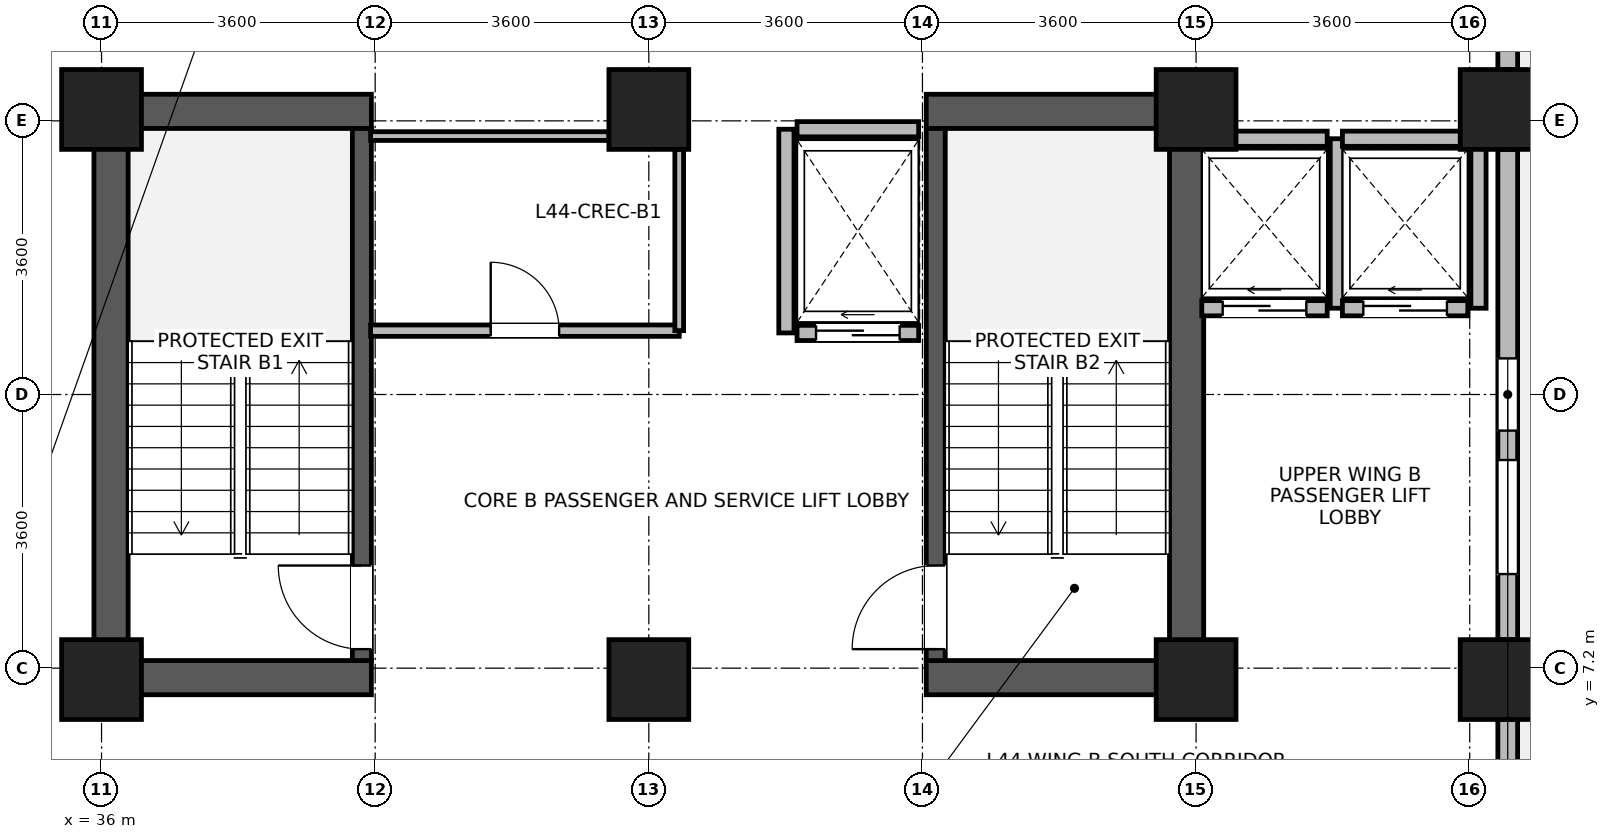
"""IFC4 building model, lengths in metres.
Left out: names, types, materials, properties, quantities, classifications, styles, units other than length and angle.
Written with IfcOpenShell. Run it as: python <this file> out.ifc"""

import sys

from ifc_helpers import new_model, si_unit, direction, frame, frame_2d, origin, origin_2d, place, context, subcontext, project, spatial, rectangle, extrude, source, transform, mapped, element, fill, save


model = new_model("IFC4")
c1 = context("Model", 3, precision=1e-05, world=origin(), true_north=direction((0.0, 1.0)))
c2 = subcontext(c1, "Body", "Model", "MODEL_VIEW")
j1 = project(units=[si_unit("LENGTHUNIT", "METRE"), si_unit("PLANEANGLEUNIT", "RADIAN")], contexts=[c1])
p1 = place(None, origin())
s1 = spatial("IfcSite", under=j1, at=p1, CompositionType="ELEMENT")
p2 = place(p1, origin())
s2 = spatial("IfcBuilding", under=s1, at=p2, CompositionType="ELEMENT")
p3 = place(p2, frame((0.0, 0.0, 173.5)))
s3 = spatial("IfcBuildingStorey", under=s2, at=p3, CompositionType="ELEMENT", Elevation=173.5)
for number, where, z_axis, x_axis in (
    (1, (36.125, 6.85, 0.0), (0.0, 0.0, 1.0), (0.0, 1.0, 0.0)),
    (2, (50.275, 6.85, 0.0), (0.0, 0.0, 1.0), (0.0, 1.0, 0.0)),
):
    element("IfcWall", number, at=place(p3, frame(where, z_axis=z_axis, x_axis=x_axis)), inside=s3, PredefinedType="SHEAR", context=c2, shape_type="SweptSolid", body=[
        extrude(rectangle(XDim=7.9, YDim=0.45, at=frame_2d((3.95, 0.0))), origin(), (0.0, 0.0, 1.0), 3.46),
    ])
for number, where, z_axis, x_axis in (
    (3, (36.35, 7.075, 0.0), (0.0, 0.0, 1.0), (1.0, 0.0, 0.0)),
    (4, (46.85, 7.075, 0.0), (0.0, 0.0, 1.0), (1.0, 0.0, 0.0)),
    (5, (36.35, 14.525, 0.0), (0.0, 0.0, 1.0), (1.0, 0.0, 0.0)),
    (6, (46.85, 14.525, 0.0), (0.0, 0.0, 1.0), (1.0, 0.0, 0.0)),
):
    element("IfcWall", number, at=place(p3, frame(where, z_axis=z_axis, x_axis=x_axis)), inside=s3, PredefinedType="SHEAR", context=c2, shape_type="SweptSolid", body=[
        extrude(rectangle(XDim=3.2, YDim=0.45, at=frame_2d((1.6, 0.0))), origin(), (0.0, 0.0, 1.0), 3.46),
    ])
p4 = place(p3, frame((39.425, 7.3, 0.0), z_axis=(0.0, 0.0, 1.0), x_axis=(0.0, 1.0, 0.0)))
e7 = element("IfcWall", 7, at=p4, inside=s3, PredefinedType="SHEAR", context=c2, shape_type="SweptSolid", body=[
    extrude(rectangle(XDim=7.0, YDim=0.25, at=frame_2d((3.5, 0.0))), origin(), (0.0, 0.0, 1.0), 3.46),
])
p5 = place(p4, frame((0.15, 0.0, 0.0)))
e8 = element("IfcOpeningElement", 8, at=p5, cuts=e7, PredefinedType="OPENING", context=c2, shape_type="SweptSolid", body=[
    extrude(rectangle(XDim=1.1, YDim=2.08, at=frame_2d((0.55, 1.04))), frame((0.0, 0.135, 0.0), z_axis=(0.0, -1.0, 0.0), x_axis=(1.0, 0.0, 0.0)), (0.0, 0.0, 1.0), 0.27),
])
p6 = place(p3, frame((46.975, 7.3, 0.0), z_axis=(0.0, 0.0, 1.0), x_axis=(0.0, 1.0, 0.0)))
e9 = element("IfcWall", 9, at=p6, inside=s3, PredefinedType="SHEAR", context=c2, shape_type="SweptSolid", body=[
    extrude(rectangle(XDim=7.0, YDim=0.25, at=frame_2d((3.5, 0.0))), origin(), (0.0, 0.0, 1.0), 3.46),
])
p7 = place(p6, frame((0.15, 0.0, 0.0)))
e10 = element("IfcOpeningElement", 10, at=p7, cuts=e9, PredefinedType="OPENING", context=c2, shape_type="SweptSolid", body=[
    extrude(rectangle(XDim=1.1, YDim=2.08, at=frame_2d((0.55, 1.04))), frame((0.0, 0.135, 0.0), z_axis=(0.0, -1.0, 0.0), x_axis=(1.0, 0.0, 0.0)), (0.0, 0.0, 1.0), 0.27),
])
m1 = source(origin(), c2, "Body", "SweptSolid", [
    extrude(rectangle(XDim=1.05, YDim=1.05, at=origin_2d()), origin(), (0.0, 0.0, 1.0), 3.7),
])
for number, where, z_axis, x_axis in (
    (11, (36.0, 7.05, 0.0), (0.0, 0.0, 1.0), (1.0, 0.0, 0.0)),
    (12, (36.0, 14.55, 0.0), (0.0, 0.0, 1.0), (1.0, 0.0, 0.0)),
    (13, (43.2, 7.05, 0.0), (0.0, 0.0, 1.0), (1.0, 0.0, 0.0)),
    (14, (43.2, 14.55, 0.0), (0.0, 0.0, 1.0), (1.0, 0.0, 0.0)),
    (15, (50.4, 7.05, 0.0), (0.0, 0.0, 1.0), (1.0, 0.0, 0.0)),
    (16, (50.4, 14.55, 0.0), (0.0, 0.0, 1.0), (1.0, 0.0, 0.0)),
    (17, (54.4, 7.05, 0.0), (0.0, 0.0, 1.0), (1.0, 0.0, 0.0)),
    (18, (54.4, 14.55, 0.0), (0.0, 0.0, 1.0), (1.0, 0.0, 0.0)),
):
    element("IfcColumn", number, at=place(p3, frame(where, z_axis=z_axis, x_axis=x_axis)), inside=s3, PredefinedType="COLUMN", context=c2, shape_type="MappedRepresentation", body=[
        mapped(m1, transform((0.0, 0.0, 0.0), x_axis=(1.0, 0.0, 0.0), y_axis=(0.0, 1.0, 0.0), z_axis=(0.0, 0.0, 1.0), scale=1.0)),
    ])
p8 = place(p3, frame((54.5, 6.524, 0.0), z_axis=(0.0, 0.0, 1.0), x_axis=(0.0, -1.0, 0.0)))
e19 = element("IfcWall", 19, at=p8, inside=s3, PredefinedType="STANDARD", context=c2, shape_type="SweptSolid", body=[
    extrude(rectangle(XDim=1.854, YDim=0.26, at=frame_2d((0.927, 0.0))), origin(), (0.0, 0.0, 1.0), 3.44),
])
p9 = place(p3, frame((54.5, 14.024, 0.0), z_axis=(0.0, 0.0, 1.0), x_axis=(0.0, -1.0, 0.0)))
e20 = element("IfcWall", 20, at=p9, inside=s3, PredefinedType="STANDARD", context=c2, shape_type="SweptSolid", body=[
    extrude(rectangle(XDim=6.448, YDim=0.26, at=frame_2d((3.224, 0.0))), origin(), (0.0, 0.0, 1.0), 2.99),
])
p10 = place(p9, frame((4.086, 0.0, 0.85)))
e21 = element("IfcOpeningElement", 21, at=p10, cuts=e20, PredefinedType="OPENING", context=c2, shape_type="SweptSolid", body=[
    extrude(rectangle(XDim=1.5, YDim=1.85, at=frame_2d((0.75, 0.925))), frame((0.0, 0.14, 0.0), z_axis=(0.0, -1.0, 0.0), x_axis=(1.0, 0.0, 0.0)), (0.0, 0.0, 1.0), 0.28),
])
p11 = place(p9, frame((2.749, 0.0, 0.85)))
e22 = element("IfcOpeningElement", 22, at=p11, cuts=e20, PredefinedType="OPENING", context=c2, shape_type="SweptSolid", body=[
    extrude(rectangle(XDim=0.95, YDim=1.75, at=frame_2d((0.475, 0.875))), frame((0.0, 0.14, 0.0), z_axis=(0.0, -1.0, 0.0), x_axis=(1.0, 0.0, 0.0)), (0.0, 0.0, 1.0), 0.28),
])
p12 = place(p3, frame((54.5, 21.074, 0.0), z_axis=(0.0, 0.0, 1.0), x_axis=(0.0, -1.0, 0.0)))
e23 = element("IfcWall", 23, at=p12, inside=s3, PredefinedType="STANDARD", context=c2, shape_type="SweptSolid", body=[
    extrude(rectangle(XDim=5.998, YDim=0.26, at=frame_2d((2.999, 0.0))), origin(), (0.0, 0.0, 1.0), 2.99),
])
p13 = place(p12, frame((2.249, 0.0, 0.0)))
e24 = element("IfcOpeningElement", 24, at=p13, cuts=e23, PredefinedType="OPENING", context=c2, shape_type="SweptSolid", body=[
    extrude(rectangle(XDim=1.5, YDim=2.15, at=frame_2d((0.75, 1.075))), frame((0.0, 0.14, 0.0), z_axis=(0.0, -1.0, 0.0), x_axis=(1.0, 0.0, 0.0)), (0.0, 0.0, 1.0), 0.28),
])
p14 = place(p3, frame((50.475, 11.935, 0.0), z_axis=(0.0, 0.0, 1.0), x_axis=(1.0, 0.0, 0.0)))
e25 = element("IfcWall", 25, at=p14, inside=s3, PredefinedType="PARTITIONING", context=c2, shape_type="SweptSolid", body=[
    extrude(rectangle(XDim=1.65, YDim=0.2, at=frame_2d((0.825, 0.0))), origin(), (0.0, 0.0, 1.0), 3.44),
])
p15 = place(p14, frame((0.275, 0.0, 0.0)))
e26 = element("IfcOpeningElement", 26, at=p15, cuts=e25, PredefinedType="OPENING", context=c2, shape_type="SweptSolid", body=[
    extrude(rectangle(XDim=1.1, YDim=2.12, at=frame_2d((0.55, 1.06))), frame((0.0, 0.11, 0.0), z_axis=(0.0, -1.0, 0.0), x_axis=(1.0, 0.0, 0.0)), (0.0, 0.0, 1.0), 0.22),
])
p16 = place(p3, frame((50.475, 14.165, 0.0), z_axis=(0.0, 0.0, 1.0), x_axis=(1.0, 0.0, 0.0)))
e27 = element("IfcWall", 27, at=p16, inside=s3, PredefinedType="PARTITIONING", context=c2, shape_type="SweptSolid", body=[
    extrude(rectangle(XDim=1.65, YDim=0.2, at=frame_2d((0.825, 0.0))), origin(), (0.0, 0.0, 1.0), 3.44),
])
p17 = place(p3, frame((52.265, 11.935, 0.0), z_axis=(0.0, 0.0, 1.0), x_axis=(0.0, 1.0, 0.0)))
e28 = element("IfcWall", 28, at=p17, inside=s3, PredefinedType="PARTITIONING", context=c2, shape_type="SweptSolid", body=[
    extrude(rectangle(XDim=2.23, YDim=0.2, at=frame_2d((1.115, 0.0))), origin(), (0.0, 0.0, 1.0), 3.44),
])
p18 = place(p3, frame((52.325, 11.935, 0.0), z_axis=(0.0, 0.0, 1.0), x_axis=(1.0, 0.0, 0.0)))
e29 = element("IfcWall", 29, at=p18, inside=s3, PredefinedType="PARTITIONING", context=c2, shape_type="SweptSolid", body=[
    extrude(rectangle(XDim=1.65, YDim=0.2, at=frame_2d((0.825, 0.0))), origin(), (0.0, 0.0, 1.0), 3.44),
])
p19 = place(p18, frame((0.275, 0.0, 0.0)))
e30 = element("IfcOpeningElement", 30, at=p19, cuts=e29, PredefinedType="OPENING", context=c2, shape_type="SweptSolid", body=[
    extrude(rectangle(XDim=1.1, YDim=2.12, at=frame_2d((0.55, 1.06))), frame((0.0, 0.11, 0.0), z_axis=(0.0, -1.0, 0.0), x_axis=(1.0, 0.0, 0.0)), (0.0, 0.0, 1.0), 0.22),
])
p20 = place(p3, frame((52.325, 14.165, 0.0), z_axis=(0.0, 0.0, 1.0), x_axis=(1.0, 0.0, 0.0)))
e31 = element("IfcWall", 31, at=p20, inside=s3, PredefinedType="PARTITIONING", context=c2, shape_type="SweptSolid", body=[
    extrude(rectangle(XDim=1.65, YDim=0.2, at=frame_2d((0.825, 0.0))), origin(), (0.0, 0.0, 1.0), 3.44),
])
p21 = place(p3, frame((54.115, 11.935, 0.0), z_axis=(0.0, 0.0, 1.0), x_axis=(0.0, 1.0, 0.0)))
e32 = element("IfcWall", 32, at=p21, inside=s3, PredefinedType="PARTITIONING", context=c2, shape_type="SweptSolid", body=[
    extrude(rectangle(XDim=2.23, YDim=0.2, at=frame_2d((1.115, 0.0))), origin(), (0.0, 0.0, 1.0), 2.99),
])
p22 = place(p3, frame((45.15, 11.61, 0.0), z_axis=(0.0, 0.0, 1.0), x_axis=(1.0, 0.0, 0.0)))
e33 = element("IfcWall", 33, at=p22, inside=s3, PredefinedType="PARTITIONING", context=c2, shape_type="SweptSolid", body=[
    extrude(rectangle(XDim=1.6, YDim=0.2, at=frame_2d((0.8, 0.0))), origin(), (0.0, 0.0, 1.0), 3.44),
])
p23 = place(p22, frame((0.25, 0.0, 0.0)))
e34 = element("IfcOpeningElement", 34, at=p23, cuts=e33, PredefinedType="OPENING", context=c2, shape_type="SweptSolid", body=[
    extrude(rectangle(XDim=1.1, YDim=2.12, at=frame_2d((0.55, 1.06))), frame((0.0, 0.11, 0.0), z_axis=(0.0, -1.0, 0.0), x_axis=(1.0, 0.0, 0.0)), (0.0, 0.0, 1.0), 0.22),
])
p24 = place(p3, frame((45.15, 14.29, 0.0), z_axis=(0.0, 0.0, 1.0), x_axis=(1.0, 0.0, 0.0)))
e35 = element("IfcWall", 35, at=p24, inside=s3, PredefinedType="PARTITIONING", context=c2, shape_type="SweptSolid", body=[
    extrude(rectangle(XDim=1.6, YDim=0.2, at=frame_2d((0.8, 0.0))), origin(), (0.0, 0.0, 1.0), 2.44),
])
p25 = place(p3, frame((45.01, 11.61, 0.0), z_axis=(0.0, 0.0, 1.0), x_axis=(0.0, 1.0, 0.0)))
e36 = element("IfcWall", 36, at=p25, inside=s3, PredefinedType="PARTITIONING", context=c2, shape_type="SweptSolid", body=[
    extrude(rectangle(XDim=2.68, YDim=0.2, at=frame_2d((1.34, 0.0))), origin(), (0.0, 0.0, 1.0), 3.44),
])
p26 = place(p3, frame((39.54, 11.64, 0.0), z_axis=(0.0, 0.0, 1.0), x_axis=(1.0, 0.0, 0.0)))
e37 = element("IfcWall", 37, at=p26, inside=s3, PredefinedType="PARTITIONING", context=c2, shape_type="SweptSolid", body=[
    extrude(rectangle(XDim=4.06, YDim=0.15, at=frame_2d((2.03, 0.0))), origin(), (0.0, 0.0, 1.0), 3.44),
])
p27 = place(p26, frame((1.58, 0.0, 0.0)))
e38 = element("IfcOpeningElement", 38, at=p27, cuts=e37, PredefinedType="OPENING", context=c2, shape_type="SweptSolid", body=[
    extrude(rectangle(XDim=0.9, YDim=2.08, at=frame_2d((0.45, 1.04))), frame((0.0, 0.085, 0.0), z_axis=(0.0, -1.0, 0.0), x_axis=(1.0, 0.0, 0.0)), (0.0, 0.0, 1.0), 0.17),
])
p28 = place(p3, frame((39.54, 14.2, 0.0), z_axis=(0.0, 0.0, 1.0), x_axis=(1.0, 0.0, 0.0)))
e39 = element("IfcWall", 39, at=p28, inside=s3, PredefinedType="PARTITIONING", context=c2, shape_type="SweptSolid", body=[
    extrude(rectangle(XDim=3.135, YDim=0.115, at=frame_2d((1.567, 0.0))), origin(), (0.0, 0.0, 1.0), 2.44),
])
p29 = place(p3, frame((43.6, 11.64, 0.0), z_axis=(0.0, 0.0, 1.0), x_axis=(0.0, 1.0, 0.0)))
e40 = element("IfcWall", 40, at=p29, inside=s3, PredefinedType="PARTITIONING", context=c2, shape_type="SweptSolid", body=[
    extrude(rectangle(XDim=2.385, YDim=0.115, at=frame_2d((1.192, 0.0))), origin(), (0.0, 0.0, 1.0), 3.44),
])
p30 = place(p10, origin())
e41 = element("IfcWindow", 41, at=p30, inside=s3, PartitioningType="SINGLE_PANEL", PredefinedType="WINDOW", context=c2, shape_type="SweptSolid", body=[
    extrude(rectangle(XDim=1.5, YDim=1.85, at=frame_2d((0.75, 0.925))), frame((0.0, 0.03, 0.0), z_axis=(0.0, -1.0, 0.0), x_axis=(1.0, 0.0, 0.0)), (0.0, 0.0, 1.0), 0.06),
])
fill(e21, e41)
p31 = place(p11, origin())
e42 = element("IfcWindow", 42, at=p31, inside=s3, PartitioningType="SINGLE_PANEL", PredefinedType="WINDOW", context=c2, shape_type="SweptSolid", body=[
    extrude(rectangle(XDim=0.95, YDim=1.75, at=frame_2d((0.475, 0.875))), frame((0.0, 0.03, 0.0), z_axis=(0.0, -1.0, 0.0), x_axis=(1.0, 0.0, 0.0)), (0.0, 0.0, 1.0), 0.06),
])
fill(e22, e42)
p32 = place(p5, origin())
e43 = element("IfcDoor", 43, at=p32, inside=s3, OperationType="SINGLE_SWING_RIGHT", PredefinedType="DOOR", context=c2, shape_type="SweptSolid", body=[
    extrude(rectangle(XDim=1.1, YDim=2.08, at=frame_2d((0.55, 1.04))), frame((0.0, 0.025, 0.0), z_axis=(0.0, -1.0, 0.0), x_axis=(1.0, 0.0, 0.0)), (0.0, 0.0, 1.0), 0.05),
])
fill(e8, e43)
p33 = place(p7, origin())
e44 = element("IfcDoor", 44, at=p33, inside=s3, OperationType="SINGLE_SWING_LEFT", PredefinedType="DOOR", context=c2, shape_type="SweptSolid", body=[
    extrude(rectangle(XDim=1.1, YDim=2.08, at=frame_2d((0.55, 1.04))), frame((0.0, 0.025, 0.0), z_axis=(0.0, -1.0, 0.0), x_axis=(1.0, 0.0, 0.0)), (0.0, 0.0, 1.0), 0.05),
])
fill(e10, e44)
p34 = place(p15, origin())
e45 = element("IfcDoor", 45, at=p34, inside=s3, OperationType="SLIDING_TO_LEFT", PredefinedType="DOOR", context=c2, shape_type="SweptSolid", body=[
    extrude(rectangle(XDim=1.1, YDim=2.12, at=frame_2d((0.55, 1.06))), frame((0.0, 0.025, 0.0), z_axis=(0.0, -1.0, 0.0), x_axis=(1.0, 0.0, 0.0)), (0.0, 0.0, 1.0), 0.05),
])
fill(e26, e45)
p35 = place(p19, origin())
e46 = element("IfcDoor", 46, at=p35, inside=s3, OperationType="SLIDING_TO_LEFT", PredefinedType="DOOR", context=c2, shape_type="SweptSolid", body=[
    extrude(rectangle(XDim=1.1, YDim=2.12, at=frame_2d((0.55, 1.06))), frame((0.0, 0.025, 0.0), z_axis=(0.0, -1.0, 0.0), x_axis=(1.0, 0.0, 0.0)), (0.0, 0.0, 1.0), 0.05),
])
fill(e30, e46)
p36 = place(p23, origin())
e47 = element("IfcDoor", 47, at=p36, inside=s3, OperationType="SLIDING_TO_LEFT", PredefinedType="DOOR", context=c2, shape_type="SweptSolid", body=[
    extrude(rectangle(XDim=1.1, YDim=2.12, at=frame_2d((0.55, 1.06))), frame((0.0, 0.025, 0.0), z_axis=(0.0, -1.0, 0.0), x_axis=(1.0, 0.0, 0.0)), (0.0, 0.0, 1.0), 0.05),
])
fill(e34, e47)
p37 = place(p27, origin())
e48 = element("IfcDoor", 48, at=p37, inside=s3, OperationType="SINGLE_SWING_LEFT", PredefinedType="DOOR", context=c2, shape_type="SweptSolid", body=[
    extrude(rectangle(XDim=0.9, YDim=2.08, at=frame_2d((0.45, 1.04))), frame((0.0, 0.025, 0.0), z_axis=(0.0, -1.0, 0.0), x_axis=(1.0, 0.0, 0.0)), (0.0, 0.0, 1.0), 0.05),
])
fill(e38, e48)
save(model, sys.argv[1])
